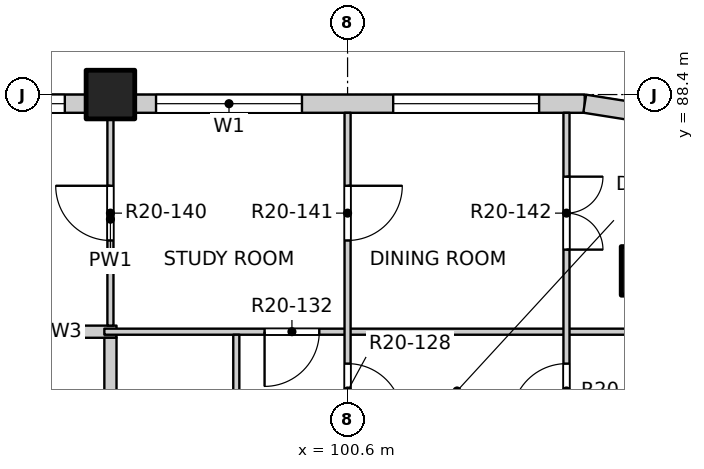
"""IFC4 building model, lengths in metres.
Left out: names, types, materials, properties, quantities, classifications, styles, units other than length and angle.
Written with IfcOpenShell. Run it as: python <this file> out.ifc"""

import sys

from ifc_helpers import new_model, si_unit, direction, frame, frame_2d, origin, origin_2d, place, context, subcontext, project, spatial, rectangle, extrude, element, fill, save


model = new_model("IFC4")
c1 = context("Model", 3, precision=1e-05, world=origin(), true_north=direction((0.0, 1.0)))
c2 = subcontext(c1, "Body", "Model", "MODEL_VIEW")
j1 = project(units=[si_unit("LENGTHUNIT", "METRE"), si_unit("PLANEANGLEUNIT", "RADIAN")], contexts=[c1])
p1 = place(None, origin())
s1 = spatial("IfcSite", under=j1, at=p1, CompositionType="ELEMENT")
p2 = place(p1, origin())
s2 = spatial("IfcBuilding", under=s1, at=p2, CompositionType="ELEMENT")
p3 = place(p2, frame((0.0, 0.0, 210.9)))
s3 = spatial("IfcBuildingStorey", under=s2, at=p3, CompositionType="ELEMENT", Elevation=210.9)
for number, where, z_axis, x_axis in (
    (1, (105.5, 85.5, -0.25), (0.0, 0.0, 1.0), (1.0, 0.0, 0.0)),
    (2, (96.7, 88.4, -0.25), (0.0, 0.0, 1.0), (1.0, 0.0, 0.0)),
):
    element("IfcColumn", number, at=place(p3, frame(where, z_axis=z_axis, x_axis=x_axis)), inside=s3, PredefinedType="COLUMN", context=c2, shape_type="SweptSolid", body=[
        extrude(rectangle(XDim=0.8, YDim=0.8, at=origin_2d()), origin(), (0.0, 0.0, 1.0), 3.4),
    ])
p4 = place(p3, frame((73.7, 88.25, 0.0), z_axis=(0.0, 0.0, 1.0), x_axis=(1.0, 0.0, 0.0)))
e3 = element("IfcWall", 3, at=p4, inside=s3, PredefinedType="SOLIDWALL", context=c2, shape_type="SweptSolid", body=[
    extrude(rectangle(XDim=22.6, YDim=0.3, at=frame_2d((11.3, 0.0))), origin(), (0.0, 0.0, 1.0), 2.7),
])
p5 = place(p4, frame((0.35, 0.0, 0.9)))
e4 = element("IfcOpeningElement", 4, at=p5, cuts=e3, PredefinedType="OPENING", context=c2, shape_type="SweptSolid", body=[
    extrude(rectangle(XDim=2.4, YDim=1.8, at=frame_2d((1.2, 0.9))), frame((0.0, 0.16, 0.0), z_axis=(0.0, -1.0, 0.0), x_axis=(1.0, 0.0, 0.0)), (0.0, 0.0, 1.0), 0.32),
])
p6 = place(p4, frame((4.25, 0.0, 0.9)))
e5 = element("IfcOpeningElement", 5, at=p6, cuts=e3, PredefinedType="OPENING", context=c2, shape_type="SweptSolid", body=[
    extrude(rectangle(XDim=2.4, YDim=1.8, at=frame_2d((1.2, 0.9))), frame((0.0, 0.16, 0.0), z_axis=(0.0, -1.0, 0.0), x_axis=(1.0, 0.0, 0.0)), (0.0, 0.0, 1.0), 0.32),
])
p7 = place(p4, frame((8.15, 0.0, 0.9)))
e6 = element("IfcOpeningElement", 6, at=p7, cuts=e3, PredefinedType="OPENING", context=c2, shape_type="SweptSolid", body=[
    extrude(rectangle(XDim=2.4, YDim=1.8, at=frame_2d((1.2, 0.9))), frame((0.0, 0.16, 0.0), z_axis=(0.0, -1.0, 0.0), x_axis=(1.0, 0.0, 0.0)), (0.0, 0.0, 1.0), 0.32),
])
p8 = place(p4, frame((12.05, 0.0, 0.9)))
e7 = element("IfcOpeningElement", 7, at=p8, cuts=e3, PredefinedType="OPENING", context=c2, shape_type="SweptSolid", body=[
    extrude(rectangle(XDim=2.4, YDim=1.8, at=frame_2d((1.2, 0.9))), frame((0.0, 0.16, 0.0), z_axis=(0.0, -1.0, 0.0), x_axis=(1.0, 0.0, 0.0)), (0.0, 0.0, 1.0), 0.32),
])
p9 = place(p4, frame((15.95, 0.0, 0.9)))
e8 = element("IfcOpeningElement", 8, at=p9, cuts=e3, PredefinedType="OPENING", context=c2, shape_type="SweptSolid", body=[
    extrude(rectangle(XDim=2.4, YDim=1.8, at=frame_2d((1.2, 0.9))), frame((0.0, 0.16, 0.0), z_axis=(0.0, -1.0, 0.0), x_axis=(1.0, 0.0, 0.0)), (0.0, 0.0, 1.0), 0.32),
])
p10 = place(p4, frame((19.85, 0.0, 0.9)))
e9 = element("IfcOpeningElement", 9, at=p10, cuts=e3, PredefinedType="OPENING", context=c2, shape_type="SweptSolid", body=[
    extrude(rectangle(XDim=2.4, YDim=1.8, at=frame_2d((1.2, 0.9))), frame((0.0, 0.16, 0.0), z_axis=(0.0, -1.0, 0.0), x_axis=(1.0, 0.0, 0.0)), (0.0, 0.0, 1.0), 0.32),
])
p11 = place(p3, frame((97.1, 88.25, 0.0), z_axis=(0.0, 0.0, 1.0), x_axis=(1.0, 0.0, 0.0)))
e10 = element("IfcWall", 10, at=p11, inside=s3, PredefinedType="SOLIDWALL", context=c2, shape_type="SweptSolid", body=[
    extrude(rectangle(XDim=7.4, YDim=0.3, at=frame_2d((3.7, 0.0))), origin(), (0.0, 0.0, 1.0), 2.7),
])
p12 = place(p11, frame((0.35, 0.0, 0.9)))
e11 = element("IfcOpeningElement", 11, at=p12, cuts=e10, PredefinedType="OPENING", context=c2, shape_type="SweptSolid", body=[
    extrude(rectangle(XDim=2.4, YDim=1.8, at=frame_2d((1.2, 0.9))), frame((0.0, 0.16, 0.0), z_axis=(0.0, -1.0, 0.0), x_axis=(1.0, 0.0, 0.0)), (0.0, 0.0, 1.0), 0.32),
])
p13 = place(p11, frame((4.25, 0.0, 0.9)))
e12 = element("IfcOpeningElement", 12, at=p13, cuts=e10, PredefinedType="OPENING", context=c2, shape_type="SweptSolid", body=[
    extrude(rectangle(XDim=2.4, YDim=1.8, at=frame_2d((1.2, 0.9))), frame((0.0, 0.16, 0.0), z_axis=(0.0, -1.0, 0.0), x_axis=(1.0, 0.0, 0.0)), (0.0, 0.0, 1.0), 0.32),
])
p14 = place(p3, frame((105.659, 88.066, 0.0), z_axis=(0.0, 0.0, 1.0), x_axis=(-0.987678452879, 0.156496880861, 0.0)))
e13 = element("IfcWall", 13, at=p14, inside=s3, PredefinedType="SOLIDWALL", context=c2, shape_type="SweptSolid", body=[
    extrude(rectangle(XDim=1.173, YDim=0.3, at=frame_2d((0.586, 0.0))), origin(), (0.0, 0.0, 1.0), 2.7),
])
p15 = place(p3, frame((94.95, 84.5, 0.0), z_axis=(0.0, 0.0, 1.0), x_axis=(1.0, 0.0, 0.0)))
e14 = element("IfcWall", 14, at=p15, inside=s3, PredefinedType="PARTITIONING", context=c2, shape_type="SweptSolid", body=[
    extrude(rectangle(XDim=1.85, YDim=0.2, at=frame_2d((0.925, 0.0))), origin(), (0.0, 0.0, 1.0), 3.15),
])
p16 = place(p3, frame((96.6, 84.5, 0.0), z_axis=(0.0, 0.0, 1.0), x_axis=(1.0, 0.0, 0.0)))
e15 = element("IfcWall", 15, at=p16, inside=s3, PredefinedType="PARTITIONING", context=c2, shape_type="SweptSolid", body=[
    extrude(rectangle(XDim=11.5, YDim=0.1, at=frame_2d((5.75, 0.0))), origin(), (0.0, 0.0, 1.0), 3.15),
])
p17 = place(p16, frame((2.635, 0.0, 0.0)))
e16 = element("IfcOpeningElement", 16, at=p17, cuts=e15, PredefinedType="OPENING", context=c2, shape_type="SweptSolid", body=[
    extrude(rectangle(XDim=0.9, YDim=2.1, at=frame_2d((0.45, 1.05))), frame((0.0, 0.06, 0.0), z_axis=(0.0, -1.0, 0.0), x_axis=(1.0, 0.0, 0.0)), (0.0, 0.0, 1.0), 0.12),
])
p18 = place(p3, frame((96.7, 49.5, 0.0), z_axis=(0.0, 0.0, 1.0), x_axis=(0.0, 1.0, 0.0)))
e17 = element("IfcWall", 17, at=p18, inside=s3, PredefinedType="PARTITIONING", context=c2, shape_type="SweptSolid", body=[
    extrude(rectangle(XDim=34.9, YDim=0.2, at=frame_2d((17.45, 0.0))), origin(), (0.0, 0.0, 1.0), 3.15),
])
p19 = place(p18, frame((9.625, 0.0, 0.0)))
e18 = element("IfcOpeningElement", 18, at=p19, cuts=e17, PredefinedType="OPENING", context=c2, shape_type="SweptSolid", body=[
    extrude(rectangle(XDim=1.0, YDim=2.1, at=frame_2d((0.5, 1.05))), frame((0.0, 0.11, 0.0), z_axis=(0.0, -1.0, 0.0), x_axis=(1.0, 0.0, 0.0)), (0.0, 0.0, 1.0), 0.22),
])
p20 = place(p18, frame((14.125, 0.0, 0.0)))
e19 = element("IfcOpeningElement", 19, at=p20, cuts=e17, PredefinedType="OPENING", context=c2, shape_type="SweptSolid", body=[
    extrude(rectangle(XDim=1.0, YDim=2.1, at=frame_2d((0.5, 1.05))), frame((0.0, 0.11, 0.0), z_axis=(0.0, -1.0, 0.0), x_axis=(1.0, 0.0, 0.0)), (0.0, 0.0, 1.0), 0.22),
])
p21 = place(p18, frame((29.275, 0.0, 0.0)))
e20 = element("IfcOpeningElement", 20, at=p21, cuts=e17, PredefinedType="OPENING", context=c2, shape_type="SweptSolid", body=[
    extrude(rectangle(XDim=1.0, YDim=2.1, at=frame_2d((0.5, 1.05))), frame((0.0, 0.11, 0.0), z_axis=(0.0, -1.0, 0.0), x_axis=(1.0, 0.0, 0.0)), (0.0, 0.0, 1.0), 0.22),
])
p22 = place(p3, frame((96.7, 84.6, 0.0), z_axis=(0.0, 0.0, 1.0), x_axis=(0.0, 1.0, 0.0)))
e21 = element("IfcWall", 21, at=p22, inside=s3, PredefinedType="PARTITIONING", context=c2, shape_type="SweptSolid", body=[
    extrude(rectangle(XDim=3.5, YDim=0.1, at=frame_2d((1.75, 0.0))), origin(), (0.0, 0.0, 1.0), 3.15),
])
p23 = place(p22, frame((1.4, 0.0, 0.0)))
e22 = element("IfcOpeningElement", 22, at=p23, cuts=e21, PredefinedType="OPENING", context=c2, shape_type="SweptSolid", body=[
    extrude(rectangle(XDim=0.9, YDim=2.1, at=frame_2d((0.45, 1.05))), frame((0.0, 0.06, 0.0), z_axis=(0.0, -1.0, 0.0), x_axis=(1.0, 0.0, 0.0)), (0.0, 0.0, 1.0), 0.12),
])
p24 = place(p3, frame((98.77, 78.65, 0.0), z_axis=(0.0, 0.0, 1.0), x_axis=(0.0, 1.0, 0.0)))
e23 = element("IfcWall", 23, at=p24, inside=s3, PredefinedType="PARTITIONING", context=c2, shape_type="SweptSolid", body=[
    extrude(rectangle(XDim=5.8, YDim=0.1, at=frame_2d((2.9, 0.0))), origin(), (0.0, 0.0, 1.0), 3.15),
])
p25 = place(p24, frame((0.7, 0.0, 0.0)))
e24 = element("IfcOpeningElement", 24, at=p25, cuts=e23, PredefinedType="OPENING", context=c2, shape_type="SweptSolid", body=[
    extrude(rectangle(XDim=0.9, YDim=2.1, at=frame_2d((0.45, 1.05))), frame((0.0, 0.06, 0.0), z_axis=(0.0, -1.0, 0.0), x_axis=(1.0, 0.0, 0.0)), (0.0, 0.0, 1.0), 0.12),
])
p26 = place(p24, frame((3.65, 0.0, 0.0)))
e25 = element("IfcOpeningElement", 25, at=p26, cuts=e23, PredefinedType="OPENING", context=c2, shape_type="SweptSolid", body=[
    extrude(rectangle(XDim=0.9, YDim=2.1, at=frame_2d((0.45, 1.05))), frame((0.0, 0.06, 0.0), z_axis=(0.0, -1.0, 0.0), x_axis=(1.0, 0.0, 0.0)), (0.0, 0.0, 1.0), 0.12),
])
p27 = place(p3, frame((100.6, 41.9, 0.0), z_axis=(0.0, 0.0, 1.0), x_axis=(0.0, 1.0, 0.0)))
e26 = element("IfcWall", 26, at=p27, inside=s3, PredefinedType="PARTITIONING", context=c2, shape_type="SweptSolid", body=[
    extrude(rectangle(XDim=46.2, YDim=0.1, at=frame_2d((23.1, 0.0))), origin(), (0.0, 0.0, 1.0), 3.15),
])
p28 = place(p27, frame((1.2, 0.0, 0.0)))
e27 = element("IfcOpeningElement", 27, at=p28, cuts=e26, PredefinedType="OPENING", context=c2, shape_type="SweptSolid", body=[
    extrude(rectangle(XDim=0.9, YDim=2.1, at=frame_2d((0.45, 1.05))), frame((0.0, 0.06, 0.0), z_axis=(0.0, -1.0, 0.0), x_axis=(1.0, 0.0, 0.0)), (0.0, 0.0, 1.0), 0.12),
])
p29 = place(p27, frame((6.025, 0.0, 0.0)))
e28 = element("IfcOpeningElement", 28, at=p29, cuts=e26, PredefinedType="OPENING", context=c2, shape_type="SweptSolid", body=[
    extrude(rectangle(XDim=0.9, YDim=2.1, at=frame_2d((0.45, 1.05))), frame((0.0, 0.06, 0.0), z_axis=(0.0, -1.0, 0.0), x_axis=(1.0, 0.0, 0.0)), (0.0, 0.0, 1.0), 0.12),
])
p30 = place(p27, frame((9.0, 0.0, 0.0)))
e29 = element("IfcOpeningElement", 29, at=p30, cuts=e26, PredefinedType="OPENING", context=c2, shape_type="SweptSolid", body=[
    extrude(rectangle(XDim=0.9, YDim=2.1, at=frame_2d((0.45, 1.05))), frame((0.0, 0.06, 0.0), z_axis=(0.0, -1.0, 0.0), x_axis=(1.0, 0.0, 0.0)), (0.0, 0.0, 1.0), 0.12),
])
p31 = place(p27, frame((13.85, 0.0, 0.0)))
e30 = element("IfcOpeningElement", 30, at=p31, cuts=e26, PredefinedType="OPENING", context=c2, shape_type="SweptSolid", body=[
    extrude(rectangle(XDim=0.9, YDim=2.1, at=frame_2d((0.45, 1.05))), frame((0.0, 0.06, 0.0), z_axis=(0.0, -1.0, 0.0), x_axis=(1.0, 0.0, 0.0)), (0.0, 0.0, 1.0), 0.12),
])
p32 = place(p27, frame((17.775, 0.0, 0.0)))
e31 = element("IfcOpeningElement", 31, at=p32, cuts=e26, PredefinedType="OPENING", context=c2, shape_type="SweptSolid", body=[
    extrude(rectangle(XDim=0.9, YDim=2.1, at=frame_2d((0.45, 1.05))), frame((0.0, 0.06, 0.0), z_axis=(0.0, -1.0, 0.0), x_axis=(1.0, 0.0, 0.0)), (0.0, 0.0, 1.0), 0.12),
])
p33 = place(p27, frame((20.7, 0.0, 0.0)))
e32 = element("IfcOpeningElement", 32, at=p33, cuts=e26, PredefinedType="OPENING", context=c2, shape_type="SweptSolid", body=[
    extrude(rectangle(XDim=0.9, YDim=2.1, at=frame_2d((0.45, 1.05))), frame((0.0, 0.06, 0.0), z_axis=(0.0, -1.0, 0.0), x_axis=(1.0, 0.0, 0.0)), (0.0, 0.0, 1.0), 0.12),
])
p34 = place(p27, frame((24.6, 0.0, 0.0)))
e33 = element("IfcOpeningElement", 33, at=p34, cuts=e26, PredefinedType="OPENING", context=c2, shape_type="SweptSolid", body=[
    extrude(rectangle(XDim=0.9, YDim=2.1, at=frame_2d((0.45, 1.05))), frame((0.0, 0.06, 0.0), z_axis=(0.0, -1.0, 0.0), x_axis=(1.0, 0.0, 0.0)), (0.0, 0.0, 1.0), 0.12),
])
p35 = place(p27, frame((29.425, 0.0, 0.0)))
e34 = element("IfcOpeningElement", 34, at=p35, cuts=e26, PredefinedType="OPENING", context=c2, shape_type="SweptSolid", body=[
    extrude(rectangle(XDim=0.9, YDim=2.1, at=frame_2d((0.45, 1.05))), frame((0.0, 0.06, 0.0), z_axis=(0.0, -1.0, 0.0), x_axis=(1.0, 0.0, 0.0)), (0.0, 0.0, 1.0), 0.12),
])
p36 = place(p27, frame((33.375, 0.0, 0.0)))
e35 = element("IfcOpeningElement", 35, at=p36, cuts=e26, PredefinedType="OPENING", context=c2, shape_type="SweptSolid", body=[
    extrude(rectangle(XDim=0.9, YDim=2.1, at=frame_2d((0.45, 1.05))), frame((0.0, 0.06, 0.0), z_axis=(0.0, -1.0, 0.0), x_axis=(1.0, 0.0, 0.0)), (0.0, 0.0, 1.0), 0.12),
])
p37 = place(p27, frame((36.3, 0.0, 0.0)))
e36 = element("IfcOpeningElement", 36, at=p37, cuts=e26, PredefinedType="OPENING", context=c2, shape_type="SweptSolid", body=[
    extrude(rectangle(XDim=0.9, YDim=2.1, at=frame_2d((0.45, 1.05))), frame((0.0, 0.06, 0.0), z_axis=(0.0, -1.0, 0.0), x_axis=(1.0, 0.0, 0.0)), (0.0, 0.0, 1.0), 0.12),
])
p38 = place(p27, frame((41.175, 0.0, 0.0)))
e37 = element("IfcOpeningElement", 37, at=p38, cuts=e26, PredefinedType="OPENING", context=c2, shape_type="SweptSolid", body=[
    extrude(rectangle(XDim=0.9, YDim=2.1, at=frame_2d((0.45, 1.05))), frame((0.0, 0.06, 0.0), z_axis=(0.0, -1.0, 0.0), x_axis=(1.0, 0.0, 0.0)), (0.0, 0.0, 1.0), 0.12),
])
p39 = place(p27, frame((44.1, 0.0, 0.0)))
e38 = element("IfcOpeningElement", 38, at=p39, cuts=e26, PredefinedType="OPENING", context=c2, shape_type="SweptSolid", body=[
    extrude(rectangle(XDim=0.9, YDim=2.1, at=frame_2d((0.45, 1.05))), frame((0.0, 0.06, 0.0), z_axis=(0.0, -1.0, 0.0), x_axis=(1.0, 0.0, 0.0)), (0.0, 0.0, 1.0), 0.12),
])
p40 = place(p3, frame((104.2, 61.2, 0.0), z_axis=(0.0, 0.0, 1.0), x_axis=(0.0, 1.0, 0.0)))
e39 = element("IfcWall", 39, at=p40, inside=s3, PredefinedType="PARTITIONING", context=c2, shape_type="SweptSolid", body=[
    extrude(rectangle(XDim=26.9, YDim=0.1, at=frame_2d((13.45, 0.0))), origin(), (0.0, 0.0, 1.0), 3.15),
])
p41 = place(p40, frame((1.25, 0.0, 0.0)))
e40 = element("IfcOpeningElement", 40, at=p41, cuts=e39, PredefinedType="OPENING", context=c2, shape_type="SweptSolid", body=[
    extrude(rectangle(XDim=1.2, YDim=2.1, at=frame_2d((0.6, 1.05))), frame((0.0, 0.06, 0.0), z_axis=(0.0, -1.0, 0.0), x_axis=(1.0, 0.0, 0.0)), (0.0, 0.0, 1.0), 0.12),
])
p42 = place(p40, frame((5.15, 0.0, 0.0)))
e41 = element("IfcOpeningElement", 41, at=p42, cuts=e39, PredefinedType="OPENING", context=c2, shape_type="SweptSolid", body=[
    extrude(rectangle(XDim=1.2, YDim=2.1, at=frame_2d((0.6, 1.05))), frame((0.0, 0.06, 0.0), z_axis=(0.0, -1.0, 0.0), x_axis=(1.0, 0.0, 0.0)), (0.0, 0.0, 1.0), 0.12),
])
p43 = place(p40, frame((8.225, 0.0, 0.0)))
e42 = element("IfcOpeningElement", 42, at=p43, cuts=e39, PredefinedType="OPENING", context=c2, shape_type="SweptSolid", body=[
    extrude(rectangle(XDim=0.9, YDim=2.1, at=frame_2d((0.45, 1.05))), frame((0.0, 0.06, 0.0), z_axis=(0.0, -1.0, 0.0), x_axis=(1.0, 0.0, 0.0)), (0.0, 0.0, 1.0), 0.12),
])
p44 = place(p40, frame((10.175, 0.0, 0.0)))
e43 = element("IfcOpeningElement", 43, at=p44, cuts=e39, PredefinedType="OPENING", context=c2, shape_type="SweptSolid", body=[
    extrude(rectangle(XDim=0.9, YDim=2.1, at=frame_2d((0.45, 1.05))), frame((0.0, 0.06, 0.0), z_axis=(0.0, -1.0, 0.0), x_axis=(1.0, 0.0, 0.0)), (0.0, 0.0, 1.0), 0.12),
])
p45 = place(p40, frame((12.125, 0.0, 0.0)))
e44 = element("IfcOpeningElement", 44, at=p45, cuts=e39, PredefinedType="OPENING", context=c2, shape_type="SweptSolid", body=[
    extrude(rectangle(XDim=0.9, YDim=2.1, at=frame_2d((0.45, 1.05))), frame((0.0, 0.06, 0.0), z_axis=(0.0, -1.0, 0.0), x_axis=(1.0, 0.0, 0.0)), (0.0, 0.0, 1.0), 0.12),
])
p46 = place(p40, frame((14.075, 0.0, 0.0)))
e45 = element("IfcOpeningElement", 45, at=p46, cuts=e39, PredefinedType="OPENING", context=c2, shape_type="SweptSolid", body=[
    extrude(rectangle(XDim=0.9, YDim=2.1, at=frame_2d((0.45, 1.05))), frame((0.0, 0.06, 0.0), z_axis=(0.0, -1.0, 0.0), x_axis=(1.0, 0.0, 0.0)), (0.0, 0.0, 1.0), 0.12),
])
p47 = place(p40, frame((16.85, 0.0, 0.0)))
e46 = element("IfcOpeningElement", 46, at=p47, cuts=e39, PredefinedType="OPENING", context=c2, shape_type="SweptSolid", body=[
    extrude(rectangle(XDim=1.2, YDim=2.1, at=frame_2d((0.6, 1.05))), frame((0.0, 0.06, 0.0), z_axis=(0.0, -1.0, 0.0), x_axis=(1.0, 0.0, 0.0)), (0.0, 0.0, 1.0), 0.12),
])
p48 = place(p40, frame((19.925, 0.0, 0.0)))
e47 = element("IfcOpeningElement", 47, at=p48, cuts=e39, PredefinedType="OPENING", context=c2, shape_type="SweptSolid", body=[
    extrude(rectangle(XDim=0.9, YDim=2.1, at=frame_2d((0.45, 1.05))), frame((0.0, 0.06, 0.0), z_axis=(0.0, -1.0, 0.0), x_axis=(1.0, 0.0, 0.0)), (0.0, 0.0, 1.0), 0.12),
])
p49 = place(p40, frame((21.875, 0.0, 0.0)))
e48 = element("IfcOpeningElement", 48, at=p49, cuts=e39, PredefinedType="OPENING", context=c2, shape_type="SweptSolid", body=[
    extrude(rectangle(XDim=0.9, YDim=2.1, at=frame_2d((0.45, 1.05))), frame((0.0, 0.06, 0.0), z_axis=(0.0, -1.0, 0.0), x_axis=(1.0, 0.0, 0.0)), (0.0, 0.0, 1.0), 0.12),
])
p50 = place(p40, frame((24.65, 0.0, 0.0)))
e49 = element("IfcOpeningElement", 49, at=p50, cuts=e39, PredefinedType="OPENING", context=c2, shape_type="SweptSolid", body=[
    extrude(rectangle(XDim=1.2, YDim=2.1, at=frame_2d((0.6, 1.05))), frame((0.0, 0.06, 0.0), z_axis=(0.0, -1.0, 0.0), x_axis=(1.0, 0.0, 0.0)), (0.0, 0.0, 1.0), 0.12),
])
p51 = place(p10, origin())
e50 = element("IfcWindow", 50, at=p51, inside=s3, PartitioningType="DOUBLE_PANEL_VERTICAL", PredefinedType="WINDOW", context=c2, shape_type="SweptSolid", body=[
    extrude(rectangle(XDim=2.4, YDim=1.8, at=frame_2d((1.2, 0.9))), frame((0.0, 0.03, 0.0), z_axis=(0.0, -1.0, 0.0), x_axis=(1.0, 0.0, 0.0)), (0.0, 0.0, 1.0), 0.06),
])
fill(e9, e50)
p52 = place(p12, origin())
e51 = element("IfcWindow", 51, at=p52, inside=s3, PartitioningType="DOUBLE_PANEL_VERTICAL", PredefinedType="WINDOW", context=c2, shape_type="SweptSolid", body=[
    extrude(rectangle(XDim=2.4, YDim=1.8, at=frame_2d((1.2, 0.9))), frame((0.0, 0.03, 0.0), z_axis=(0.0, -1.0, 0.0), x_axis=(1.0, 0.0, 0.0)), (0.0, 0.0, 1.0), 0.06),
])
fill(e11, e51)
p53 = place(p13, origin())
e52 = element("IfcWindow", 52, at=p53, inside=s3, PartitioningType="DOUBLE_PANEL_VERTICAL", PredefinedType="WINDOW", context=c2, shape_type="SweptSolid", body=[
    extrude(rectangle(XDim=2.4, YDim=1.8, at=frame_2d((1.2, 0.9))), frame((0.0, 0.03, 0.0), z_axis=(0.0, -1.0, 0.0), x_axis=(1.0, 0.0, 0.0)), (0.0, 0.0, 1.0), 0.06),
])
fill(e12, e52)
p54 = place(p38, origin())
e53 = element("IfcDoor", 53, at=p54, inside=s3, OperationType="SINGLE_SWING_RIGHT", PredefinedType="DOOR", context=c2, shape_type="SweptSolid", body=[
    extrude(rectangle(XDim=0.9, YDim=2.1, at=frame_2d((0.45, 1.05))), frame((0.0, 0.025, 0.0), z_axis=(0.0, -1.0, 0.0), x_axis=(1.0, 0.0, 0.0)), (0.0, 0.0, 1.0), 0.05),
])
fill(e37, e53)
p55 = place(p49, origin())
e54 = element("IfcDoor", 54, at=p55, inside=s3, OperationType="SINGLE_SWING_LEFT", PredefinedType="DOOR", context=c2, shape_type="SweptSolid", body=[
    extrude(rectangle(XDim=0.9, YDim=2.1, at=frame_2d((0.45, 1.05))), frame((0.0, 0.025, 0.0), z_axis=(0.0, -1.0, 0.0), x_axis=(1.0, 0.0, 0.0)), (0.0, 0.0, 1.0), 0.05),
])
fill(e48, e54)
p56 = place(p17, origin())
e55 = element("IfcDoor", 55, at=p56, inside=s3, OperationType="SINGLE_SWING_RIGHT", PredefinedType="DOOR", context=c2, shape_type="SweptSolid", body=[
    extrude(rectangle(XDim=0.9, YDim=2.1, at=frame_2d((0.45, 1.05))), frame((0.0, 0.025, 0.0), z_axis=(0.0, -1.0, 0.0), x_axis=(1.0, 0.0, 0.0)), (0.0, 0.0, 1.0), 0.05),
])
fill(e16, e55)
p57 = place(p23, origin())
e56 = element("IfcDoor", 56, at=p57, inside=s3, OperationType="SINGLE_SWING_RIGHT", PredefinedType="DOOR", context=c2, shape_type="SweptSolid", body=[
    extrude(rectangle(XDim=0.9, YDim=2.1, at=frame_2d((0.45, 1.05))), frame((0.0, 0.025, 0.0), z_axis=(0.0, -1.0, 0.0), x_axis=(1.0, 0.0, 0.0)), (0.0, 0.0, 1.0), 0.05),
])
fill(e22, e56)
p58 = place(p39, origin())
e57 = element("IfcDoor", 57, at=p58, inside=s3, OperationType="SINGLE_SWING_LEFT", PredefinedType="DOOR", context=c2, shape_type="SweptSolid", body=[
    extrude(rectangle(XDim=0.9, YDim=2.1, at=frame_2d((0.45, 1.05))), frame((0.0, 0.025, 0.0), z_axis=(0.0, -1.0, 0.0), x_axis=(1.0, 0.0, 0.0)), (0.0, 0.0, 1.0), 0.05),
])
fill(e38, e57)
p59 = place(p50, origin())
e58 = element("IfcDoor", 58, at=p59, inside=s3, OperationType="DOUBLE_DOOR_SINGLE_SWING", PredefinedType="DOOR", context=c2, shape_type="SweptSolid", body=[
    extrude(rectangle(XDim=1.2, YDim=2.1, at=frame_2d((0.6, 1.05))), frame((0.0, 0.025, 0.0), z_axis=(0.0, -1.0, 0.0), x_axis=(1.0, 0.0, 0.0)), (0.0, 0.0, 1.0), 0.05),
])
fill(e49, e58)
save(model, sys.argv[1])
